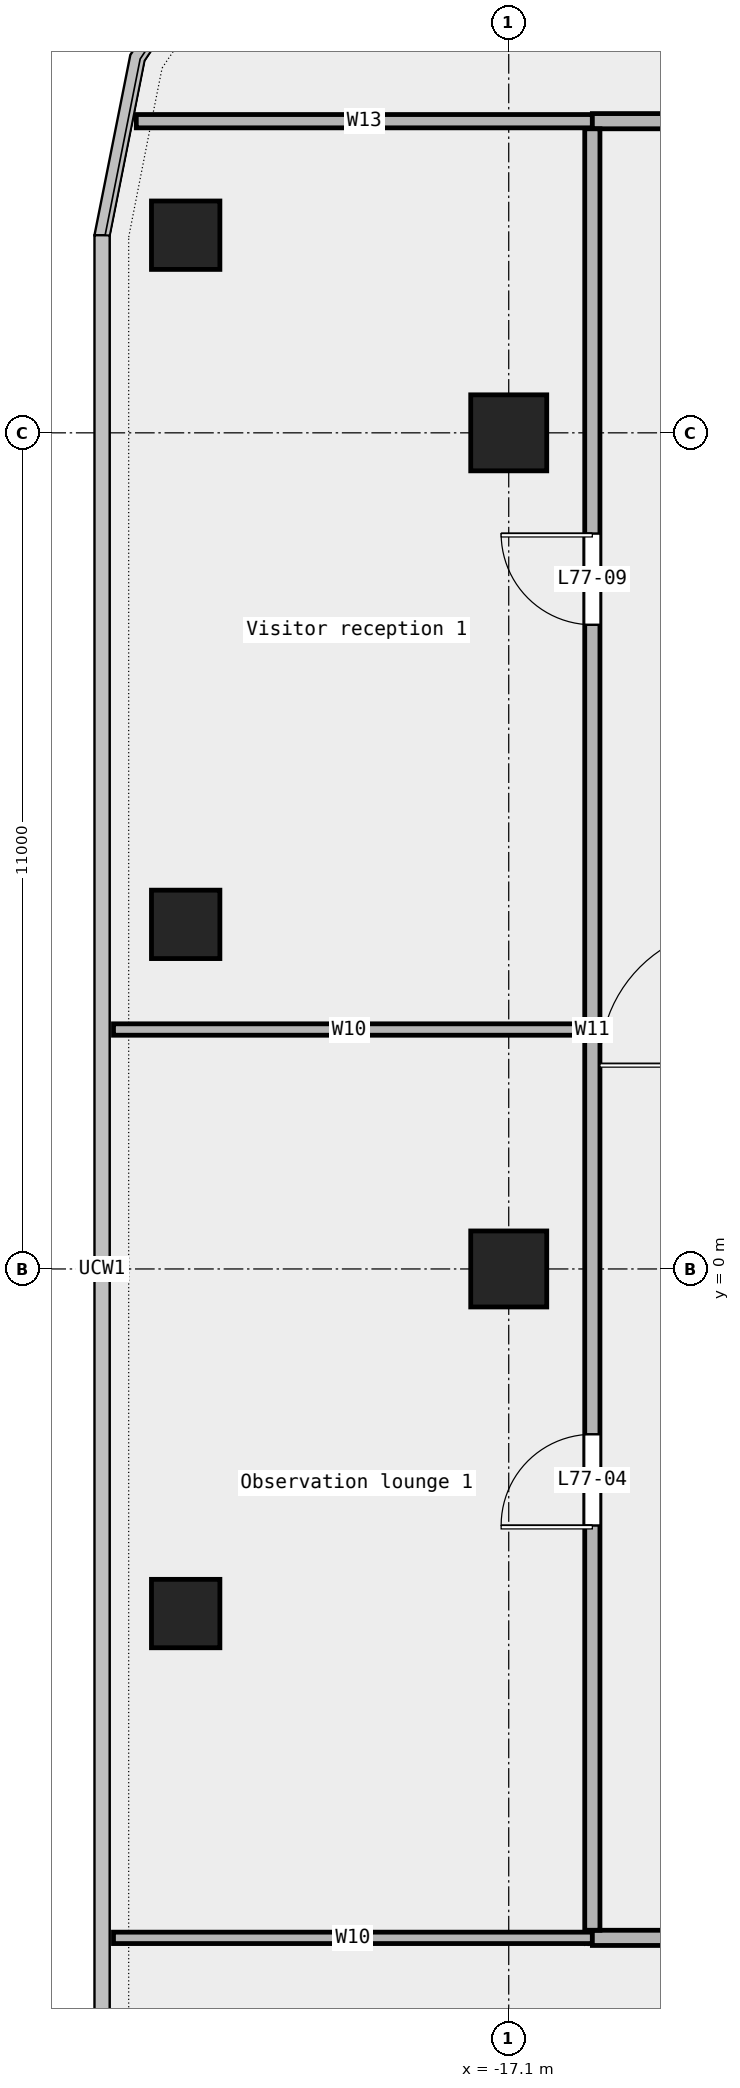
"""IFC4 building model, lengths in metres.
Left out: names, types, materials, properties, quantities, classifications, styles, units other than length and angle.
Written with IfcOpenShell. Run it as: python <this file> out.ifc"""

import sys

from ifc_helpers import new_model, si_unit, direction, frame, frame_2d, origin, origin_2d, place, context, subcontext, project, spatial, rectangle, extrude, element, fill, save


model = new_model("IFC4")
c1 = context("Model", 3, precision=1e-05, world=origin(), true_north=direction((0.0, 1.0)))
c2 = subcontext(c1, "Body", "Model", "MODEL_VIEW")
j1 = project(units=[si_unit("LENGTHUNIT", "METRE"), si_unit("PLANEANGLEUNIT", "RADIAN")], contexts=[c1])
p1 = place(None, origin())
s1 = spatial("IfcSite", under=j1, at=p1, CompositionType="ELEMENT")
p2 = place(p1, origin())
s2 = spatial("IfcBuilding", under=s1, at=p2, CompositionType="ELEMENT")
p3 = place(p2, frame((0.0, 0.0, 353.4)))
s3 = spatial("IfcBuildingStorey", under=s2, at=p3, CompositionType="ELEMENT", Elevation=353.4)
for number, where, z_axis, x_axis in (
    (1, (-21.35, 13.6, 0.0), (0.0, 0.0, 1.0), (1.0, 0.0, 0.0)),
    (2, (-21.35, 4.533, 0.0), (0.0, 0.0, 1.0), (1.0, 0.0, 0.0)),
    (3, (-21.35, -4.533, 0.0), (0.0, 0.0, 1.0), (1.0, 0.0, 0.0)),
):
    element("IfcColumn", number, at=place(p3, frame(where, z_axis=z_axis, x_axis=x_axis)), inside=s3, PredefinedType="COLUMN", context=c2, shape_type="SweptSolid", body=[
        extrude(rectangle(XDim=0.9, YDim=0.9, at=origin_2d()), origin(), (0.0, 0.0, 1.0), 3.6),
    ])
for number, where, z_axis, x_axis in (
    (4, (-17.1, 0.0, 0.0), (0.0, 0.0, 1.0), (1.0, 0.0, 0.0)),
    (5, (-17.1, 11.0, 0.0), (0.0, 0.0, 1.0), (1.0, 0.0, 0.0)),
):
    element("IfcColumn", number, at=place(p3, frame(where, z_axis=z_axis, x_axis=x_axis)), inside=s3, PredefinedType="COLUMN", context=c2, shape_type="SweptSolid", body=[
        extrude(rectangle(XDim=1.0, YDim=1.0, at=origin_2d()), origin(), (0.0, 0.0, 1.0), 3.6),
    ])
p4 = place(p3, frame((-22.3, -8.8, 0.0), z_axis=(0.0, 0.0, 1.0), x_axis=(1.0, 0.0, 0.0)))
e6 = element("IfcWall", 6, at=p4, inside=s3, PredefinedType="PARTITIONING", context=c2, shape_type="SweptSolid", body=[
    extrude(rectangle(XDim=6.3, YDim=0.15, at=frame_2d((3.15, 0.0))), origin(), (0.0, 0.0, 1.0), 3.6),
])
p5 = place(p3, frame((-16.0, -8.8, 0.0), z_axis=(0.0, 0.0, 1.0), x_axis=(1.0, 0.0, 0.0)))
e7 = element("IfcWall", 7, at=p5, inside=s3, PredefinedType="PARTITIONING", context=c2, shape_type="SweptSolid", body=[
    extrude(rectangle(XDim=32.0, YDim=0.2, at=frame_2d((16.0, 0.0))), origin(), (0.0, 0.0, 1.0), 3.6),
])
p6 = place(p5, frame((25.31, 0.0, 0.0)))
e8 = element("IfcOpeningElement", 8, at=p6, cuts=e7, PredefinedType="OPENING", context=c2, shape_type="SweptSolid", body=[
    extrude(rectangle(XDim=1.8, YDim=2.1, at=frame_2d((0.9, 1.05))), frame((0.0, 0.112, 0.0), z_axis=(0.0, -1.0, 0.0), x_axis=(1.0, 0.0, 0.0)), (0.0, 0.0, 1.0), 0.224),
])
p7 = place(p5, frame((7.81, 0.0, 0.0)))
e9 = element("IfcOpeningElement", 9, at=p7, cuts=e7, PredefinedType="OPENING", context=c2, shape_type="SweptSolid", body=[
    extrude(rectangle(XDim=1.8, YDim=2.1, at=frame_2d((0.9, 1.05))), frame((0.0, 0.112, 0.0), z_axis=(0.0, -1.0, 0.0), x_axis=(1.0, 0.0, 0.0)), (0.0, 0.0, 1.0), 0.224),
])
p8 = place(p3, frame((-22.3, 3.15, 0.0), z_axis=(0.0, 0.0, 1.0), x_axis=(1.0, 0.0, 0.0)))
e10 = element("IfcWall", 10, at=p8, inside=s3, PredefinedType="PARTITIONING", context=c2, shape_type="SweptSolid", body=[
    extrude(rectangle(XDim=6.2, YDim=0.15, at=frame_2d((3.1, 0.0))), origin(), (0.0, 0.0, 1.0), 3.6),
])
p9 = place(p3, frame((-22.0, 15.1, 0.0), z_axis=(0.0, 0.0, 1.0), x_axis=(1.0, 0.0, 0.0)))
e11 = element("IfcWall", 11, at=p9, inside=s3, PredefinedType="PARTITIONING", context=c2, shape_type="SweptSolid", body=[
    extrude(rectangle(XDim=6.0, YDim=0.175, at=frame_2d((3.0, 0.0))), origin(), (0.0, 0.0, 1.0), 3.6),
])
p10 = place(p3, frame((-16.0, 15.1, 0.0), z_axis=(0.0, 0.0, 1.0), x_axis=(1.0, 0.0, 0.0)))
e12 = element("IfcWall", 12, at=p10, inside=s3, PredefinedType="PARTITIONING", context=c2, shape_type="SweptSolid", body=[
    extrude(rectangle(XDim=32.0, YDim=0.2, at=frame_2d((16.0, 0.0))), origin(), (0.0, 0.0, 1.0), 3.6),
])
p11 = place(p10, frame((5.823, 0.0, 0.0)))
e13 = element("IfcOpeningElement", 13, at=p11, cuts=e12, PredefinedType="OPENING", context=c2, shape_type="SweptSolid", body=[
    extrude(rectangle(XDim=1.2, YDim=2.1, at=frame_2d((0.6, 1.05))), frame((0.0, 0.112, 0.0), z_axis=(0.0, -1.0, 0.0), x_axis=(1.0, 0.0, 0.0)), (0.0, 0.0, 1.0), 0.224),
])
p12 = place(p10, frame((18.558, 0.0, 0.0)))
e14 = element("IfcOpeningElement", 14, at=p12, cuts=e12, PredefinedType="OPENING", context=c2, shape_type="SweptSolid", body=[
    extrude(rectangle(XDim=1.2, YDim=2.1, at=frame_2d((0.6, 1.05))), frame((0.0, 0.112, 0.0), z_axis=(0.0, -1.0, 0.0), x_axis=(1.0, 0.0, 0.0)), (0.0, 0.0, 1.0), 0.224),
])
p13 = place(p10, frame((28.135, 0.0, 0.0)))
e15 = element("IfcOpeningElement", 15, at=p13, cuts=e12, PredefinedType="OPENING", context=c2, shape_type="SweptSolid", body=[
    extrude(rectangle(XDim=1.2, YDim=2.1, at=frame_2d((0.6, 1.05))), frame((0.0, 0.112, 0.0), z_axis=(0.0, -1.0, 0.0), x_axis=(1.0, 0.0, 0.0)), (0.0, 0.0, 1.0), 0.224),
])
p14 = place(p3, frame((-16.0, -8.7, 0.0), z_axis=(0.0, 0.0, 1.0), x_axis=(0.0, 1.0, 0.0)))
e16 = element("IfcWall", 16, at=p14, inside=s3, PredefinedType="PARTITIONING", context=c2, shape_type="SweptSolid", body=[
    extrude(rectangle(XDim=23.7, YDim=0.2, at=frame_2d((11.85, 0.0))), origin(), (0.0, 0.0, 1.0), 3.6),
])
p15 = place(p14, frame((5.325, 0.0, 0.0)))
e17 = element("IfcOpeningElement", 17, at=p15, cuts=e16, PredefinedType="OPENING", context=c2, shape_type="SweptSolid", body=[
    extrude(rectangle(XDim=1.2, YDim=2.1, at=frame_2d((0.6, 1.05))), frame((0.0, 0.112, 0.0), z_axis=(0.0, -1.0, 0.0), x_axis=(1.0, 0.0, 0.0)), (0.0, 0.0, 1.0), 0.224),
])
p16 = place(p14, frame((17.175, 0.0, 0.0)))
e18 = element("IfcOpeningElement", 18, at=p16, cuts=e16, PredefinedType="OPENING", context=c2, shape_type="SweptSolid", body=[
    extrude(rectangle(XDim=1.2, YDim=2.1, at=frame_2d((0.6, 1.05))), frame((0.0, 0.112, 0.0), z_axis=(0.0, -1.0, 0.0), x_axis=(1.0, 0.0, 0.0)), (0.0, 0.0, 1.0), 0.224),
])
p17 = place(p15, origin())
e19 = element("IfcDoor", 19, at=p17, inside=s3, OperationType="SINGLE_SWING_LEFT", PredefinedType="DOOR", context=c2, shape_type="SweptSolid", body=[
    extrude(rectangle(XDim=1.2, YDim=2.1, at=frame_2d((0.6, 1.05))), frame((0.0, 0.025, 0.0), z_axis=(0.0, -1.0, 0.0), x_axis=(1.0, 0.0, 0.0)), (0.0, 0.0, 1.0), 0.05),
])
fill(e17, e19)
p18 = place(p16, origin())
e20 = element("IfcDoor", 20, at=p18, inside=s3, OperationType="SINGLE_SWING_RIGHT", PredefinedType="DOOR", context=c2, shape_type="SweptSolid", body=[
    extrude(rectangle(XDim=1.2, YDim=2.1, at=frame_2d((0.6, 1.05))), frame((0.0, 0.025, 0.0), z_axis=(0.0, -1.0, 0.0), x_axis=(1.0, 0.0, 0.0)), (0.0, 0.0, 1.0), 0.05),
])
fill(e18, e20)
save(model, sys.argv[1])
